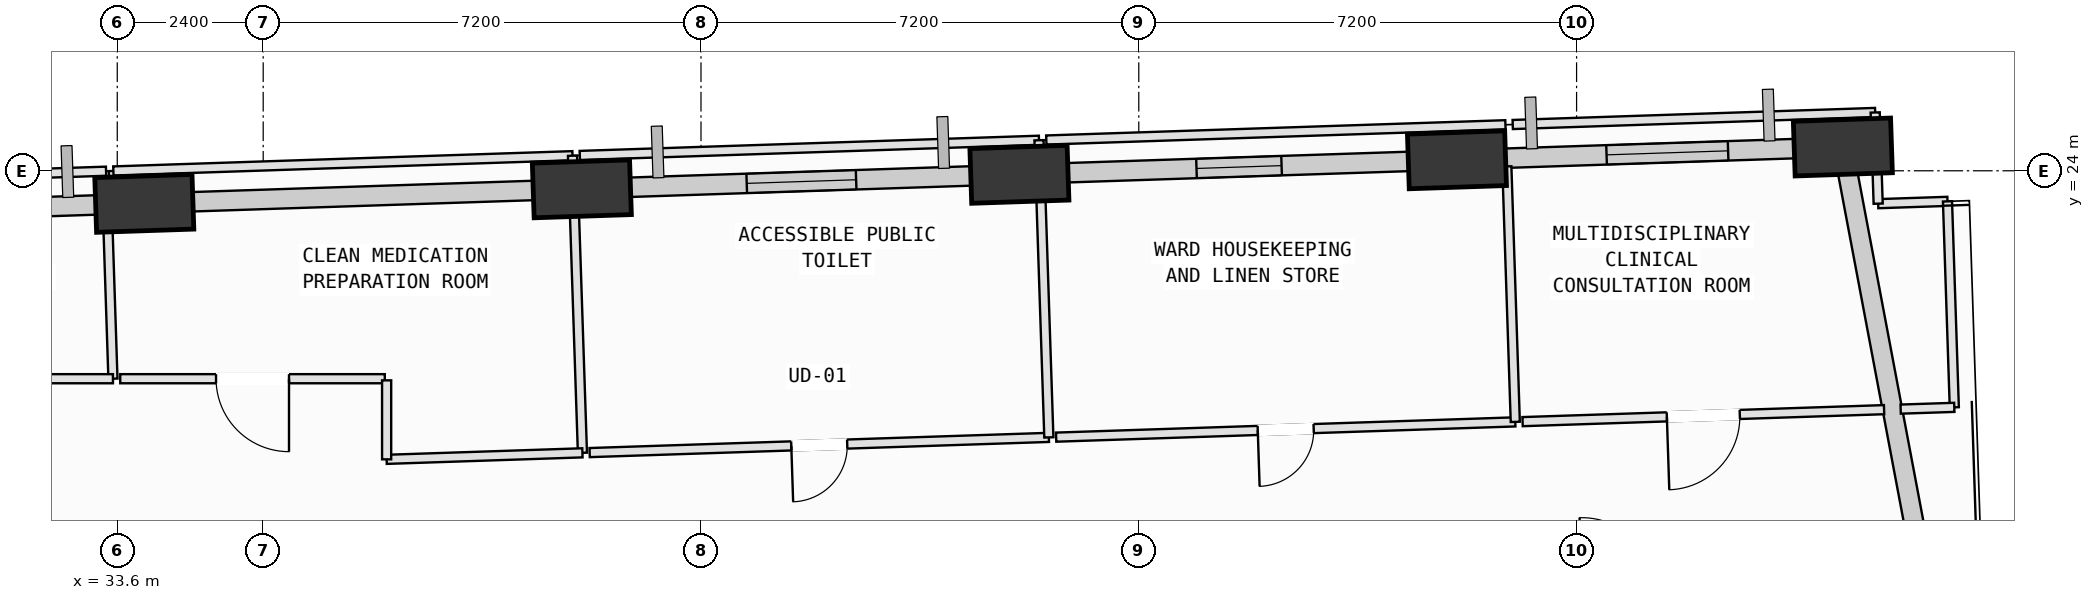
"""IFC4 building model, lengths in metres.
Left out: names, types, materials, properties, quantities, classifications, styles, units other than length and angle.
Written with IfcOpenShell. Run it as: python <this file> out.ifc"""

import sys

from ifc_helpers import new_model, si_unit, direction, frame, frame_2d, origin, origin_2d, place, context, subcontext, project, spatial, rectangle, extrude, element, fill, save


model = new_model("IFC4")
c1 = context("Model", 3, precision=1e-05, world=origin(), true_north=direction((0.0, 1.0)))
c2 = subcontext(c1, "Body", "Model", "MODEL_VIEW")
j1 = project(units=[si_unit("LENGTHUNIT", "METRE"), si_unit("PLANEANGLEUNIT", "RADIAN")], contexts=[c1])
p1 = place(None, origin())
s1 = spatial("IfcSite", under=j1, at=p1, CompositionType="ELEMENT")
p2 = place(p1, origin())
s2 = spatial("IfcBuilding", under=s1, at=p2, CompositionType="ELEMENT")
p3 = place(p2, frame((0.0, 0.0, 31.0)))
s3 = spatial("IfcBuildingStorey", under=s2, at=p3, CompositionType="ELEMENT", Elevation=31.0)
p4 = place(p3, frame((61.979, 24.391, 0.002), z_axis=(0.000728026521, 0.116848256675, 0.993149512858), x_axis=(-0.999635972632, -0.026700426873, 0.003874199989)))
e1 = element("IfcColumn", 1, at=p4, inside=s3, PredefinedType="COLUMN", context=c2, shape_type="SweptSolid", body=[
    extrude(rectangle(XDim=1.6, YDim=0.9, at=origin_2d()), origin(), (0.0, 0.0, 1.0), 4.024),
])
p5 = place(p3, frame((55.633, 24.18, 0.002), z_axis=(0.001825022721, 0.090946965617, 0.99585406498), x_axis=(-0.999911476925, -0.012959253043, 0.003015969921)))
e2 = element("IfcColumn", 2, at=p5, inside=s3, PredefinedType="COLUMN", context=c2, shape_type="SweptSolid", body=[
    extrude(rectangle(XDim=1.6, YDim=0.9, at=origin_2d()), origin(), (0.0, 0.0, 1.0), 4.013),
])
p6 = place(p3, frame((48.437, 23.942, 0.002), z_axis=(0.003048590926, 0.061398621247, 0.998108669135), x_axis=(-0.999861584923, 0.016512321964, 0.002038190045)))
e3 = element("IfcColumn", 3, at=p6, inside=s3, PredefinedType="COLUMN", context=c2, shape_type="SweptSolid", body=[
    extrude(rectangle(XDim=1.6, YDim=0.9, at=origin_2d()), origin(), (0.0, 0.0, 1.0), 4.004),
])
p7 = place(p3, frame((41.24, 23.703, 0.002), z_axis=(0.004334983307, 0.031688117412, 0.999488404702), x_axis=(-0.99471880783, 0.102632201953, 0.001060410662)))
e4 = element("IfcColumn", 4, at=p7, inside=s3, PredefinedType="COLUMN", context=c2, shape_type="SweptSolid", body=[
    extrude(rectangle(XDim=1.6, YDim=0.9, at=origin_2d()), origin(), (0.0, 0.0, 1.0), 3.999),
])
p8 = place(p3, frame((34.044, 23.464, 0.002), z_axis=(0.005558854074, 0.001832589255, 0.999982870232), x_axis=(-0.344410613916, 0.938819094055, 0.000194061884)))
e5 = element("IfcColumn", 5, at=p8, inside=s3, PredefinedType="COLUMN", context=c2, shape_type="SweptSolid", body=[
    extrude(rectangle(XDim=1.6, YDim=0.9, at=origin_2d()), origin(), (0.0, 0.0, 1.0), 3.997),
])
p9 = place(p3, frame((62.049, 24.022, 0.0), z_axis=(0.0, 0.0, 1.0), x_axis=(0.185503389707, -0.982643624315, 0.0)))
e6 = element("IfcWall", 6, at=p9, inside=s3, PredefinedType="SOLIDWALL", context=c2, shape_type="SweptSolid", body=[
    extrude(rectangle(XDim=8.614, YDim=0.32, at=frame_2d((4.307, 0.0))), origin(), (0.0, 0.0, 1.0), 3.165),
])
p10 = place(p3, frame((56.222, 24.2, 0.0), z_axis=(0.0, 0.0, 1.0), x_axis=(0.999450872854, 0.033135370087, 0.0)))
e7 = element("IfcWall", 7, at=p10, inside=s3, PredefinedType="SOLIDWALL", context=c2, shape_type="SweptSolid", body=[
    extrude(rectangle(XDim=5.209, YDim=0.32, at=frame_2d((2.604, 0.0))), origin(), (0.0, 0.0, 1.0), 3.165),
])
p11 = place(p10, frame((1.872, 0.0, 0.75)))
e8 = element("IfcOpeningElement", 8, at=p11, cuts=e7, PredefinedType="OPENING", context=c2, shape_type="SweptSolid", body=[
    extrude(rectangle(XDim=2.0, YDim=1.95, at=frame_2d((1.0, 0.975))), frame((0.0, 0.17, 0.0), z_axis=(0.0, -1.0, 0.0), x_axis=(1.0, 0.0, 0.0)), (0.0, 0.0, 1.0), 0.34),
])
p12 = place(p3, frame((49.042, 23.961, 0.0), z_axis=(0.0, 0.0, 1.0), x_axis=(0.999449037316, 0.033190688572, 0.0)))
e9 = element("IfcWall", 9, at=p12, inside=s3, PredefinedType="SOLIDWALL", context=c2, shape_type="SweptSolid", body=[
    extrude(rectangle(XDim=6.024, YDim=0.32, at=frame_2d((3.012, 0.0))), origin(), (0.0, 0.0, 1.0), 3.165),
])
p13 = place(p12, frame((2.309, 0.0, 0.75)))
e10 = element("IfcOpeningElement", 10, at=p13, cuts=e9, PredefinedType="OPENING", context=c2, shape_type="SweptSolid", body=[
    extrude(rectangle(XDim=1.4, YDim=1.85, at=frame_2d((0.7, 0.925))), frame((0.0, 0.17, 0.0), z_axis=(0.0, -1.0, 0.0), x_axis=(1.0, 0.0, 0.0)), (0.0, 0.0, 1.0), 0.34),
])
p14 = place(p3, frame((41.855, 23.723, 0.0), z_axis=(0.0, 0.0, 1.0), x_axis=(0.999449908842, 0.033164434498, 0.0)))
e11 = element("IfcWall", 11, at=p14, inside=s3, PredefinedType="SOLIDWALL", context=c2, shape_type="SweptSolid", body=[
    extrude(rectangle(XDim=6.0, YDim=0.32, at=frame_2d((3.0, 0.0))), origin(), (0.0, 0.0, 1.0), 3.165),
])
p15 = place(p14, frame((2.098, 0.0, 0.75)))
e12 = element("IfcOpeningElement", 12, at=p15, cuts=e11, PredefinedType="OPENING", context=c2, shape_type="SweptSolid", body=[
    extrude(rectangle(XDim=1.8, YDim=2.05, at=frame_2d((0.9, 1.025))), frame((0.0, 0.17, 0.0), z_axis=(0.0, -1.0, 0.0), x_axis=(1.0, 0.0, 0.0)), (0.0, 0.0, 1.0), 0.34),
])
p16 = place(p3, frame((34.663, 23.485, 0.0), z_axis=(0.0, 0.0, 1.0), x_axis=(0.999450324631, 0.033151901833, 0.0)))
e13 = element("IfcWall", 13, at=p16, inside=s3, PredefinedType="SOLIDWALL", context=c2, shape_type="SweptSolid", body=[
    extrude(rectangle(XDim=5.987, YDim=0.32, at=frame_2d((2.994, 0.0))), origin(), (0.0, 0.0, 1.0), 3.165),
])
p17 = place(p3, frame((27.715, 23.254, 0.0), z_axis=(0.0, 0.0, 1.0), x_axis=(0.999450231938, 0.033154696192, 0.0)))
e14 = element("IfcWall", 14, at=p17, inside=s3, PredefinedType="SOLIDWALL", context=c2, shape_type="SweptSolid", body=[
    extrude(rectangle(XDim=5.736, YDim=0.32, at=frame_2d((2.868, 0.0))), origin(), (0.0, 0.0, 1.0), 3.165),
])
p18 = place(p17, frame((1.957, 0.0, 0.75)))
e15 = element("IfcOpeningElement", 15, at=p18, cuts=e14, PredefinedType="OPENING", context=c2, shape_type="SweptSolid", body=[
    extrude(rectangle(XDim=1.6, YDim=1.95, at=frame_2d((0.8, 0.975))), frame((0.0, 0.17, 0.0), z_axis=(0.0, -1.0, 0.0), x_axis=(1.0, 0.0, 0.0)), (0.0, 0.0, 1.0), 0.34),
])
p19 = place(p3, frame((27.63, 23.802, 0.0), z_axis=(0.0, 0.0, 1.0), x_axis=(0.999456083322, 0.032977833635, 0.0)))
e16 = element("IfcWall", 16, at=p19, inside=s3, PredefinedType="PARTITIONING", context=c2, shape_type="SweptSolid", body=[
    extrude(rectangle(XDim=5.789, YDim=0.15, at=frame_2d((2.895, 0.0))), origin(), (0.0, 0.0, 1.0), 3.78),
])
p20 = place(p3, frame((33.439, 23.309, 0.0), z_axis=(0.0, 0.0, 1.0), x_axis=(0.03299329991, -0.99945557288, 0.0)))
e17 = element("IfcWall", 17, at=p20, inside=s3, PredefinedType="PARTITIONING", context=c2, shape_type="SweptSolid", body=[
    extrude(rectangle(XDim=2.73, YDim=0.15, at=frame_2d((1.365, 0.0))), origin(), (0.0, 0.0, 1.0), 3.78),
])
p21 = place(p3, frame((33.529, 20.58, 0.0), z_axis=(0.0, 0.0, 1.0), x_axis=(-1.0, 0.0, 0.0)))
e18 = element("IfcWall", 18, at=p21, inside=s3, PredefinedType="PARTITIONING", context=c2, shape_type="SweptSolid", body=[
    extrude(rectangle(XDim=7.559, YDim=0.15, at=frame_2d((3.78, 0.0))), origin(), (0.0, 0.0, 1.0), 3.78),
])
p22 = place(p21, frame((3.179, 0.0, 0.0)))
e19 = element("IfcOpeningElement", 19, at=p22, cuts=e18, PredefinedType="OPENING", context=c2, shape_type="SweptSolid", body=[
    extrude(rectangle(XDim=1.2, YDim=2.15, at=frame_2d((0.6, 1.075))), frame((0.0, 0.085, 0.0), z_axis=(0.0, -1.0, 0.0), x_axis=(1.0, 0.0, 0.0)), (0.0, 0.0, 1.0), 0.17),
])
p23 = place(p3, frame((38.0, 20.58, 0.0), z_axis=(0.0, 0.0, 1.0), x_axis=(-1.0, 0.0, 0.0)))
e20 = element("IfcWall", 20, at=p23, inside=s3, PredefinedType="PARTITIONING", context=c2, shape_type="SweptSolid", body=[
    extrude(rectangle(XDim=4.351, YDim=0.15, at=frame_2d((2.176, 0.0))), origin(), (0.0, 0.0, 1.0), 3.365),
])
p24 = place(p23, frame((1.575, 0.0, 0.0)))
e21 = element("IfcOpeningElement", 21, at=p24, cuts=e20, PredefinedType="OPENING", context=c2, shape_type="SweptSolid", body=[
    extrude(rectangle(XDim=1.2, YDim=2.15, at=frame_2d((0.6, 1.075))), frame((0.0, 0.085, 0.0), z_axis=(0.0, -1.0, 0.0), x_axis=(1.0, 0.0, 0.0)), (0.0, 0.0, 1.0), 0.17),
])
p25 = place(p3, frame((33.551, 23.531, 0.0), z_axis=(0.0, 0.0, 1.0), x_axis=(-0.03246062176, 0.999473015161, 0.0)))
e22 = element("IfcWall", 22, at=p25, inside=s3, PredefinedType="PARTITIONING", context=c2, shape_type="SweptSolid", body=[
    extrude(rectangle(XDim=0.466, YDim=0.15, at=frame_2d((0.233, 0.0))), origin(), (0.0, 0.0, 1.0), 3.78),
])
p26 = place(p3, frame((33.536, 23.997, 0.0), z_axis=(0.0, 0.0, 1.0), x_axis=(0.999448094367, 0.033219070808, 0.0)))
e23 = element("IfcWall", 23, at=p26, inside=s3, PredefinedType="PARTITIONING", context=c2, shape_type="SweptSolid", body=[
    extrude(rectangle(XDim=7.555, YDim=0.15, at=frame_2d((3.778, 0.0))), origin(), (0.0, 0.0, 1.0), 3.78),
])
p27 = place(p3, frame((41.087, 24.248, 0.0), z_axis=(0.0, 0.0, 1.0), x_axis=(0.033353067191, -0.999443631682, 0.0)))
e24 = element("IfcWall", 24, at=p27, inside=s3, PredefinedType="PARTITIONING", context=c2, shape_type="SweptSolid", body=[
    extrude(rectangle(XDim=4.89, YDim=0.15, at=frame_2d((2.445, 0.0))), origin(), (0.0, 0.0, 1.0), 3.78),
])
p28 = place(p3, frame((41.25, 19.361, 0.0), z_axis=(0.0, 0.0, 1.0), x_axis=(-0.999446503828, -0.033266890225, 0.0)))
e25 = element("IfcWall", 25, at=p28, inside=s3, PredefinedType="PARTITIONING", context=c2, shape_type="SweptSolid", body=[
    extrude(rectangle(XDim=3.222, YDim=0.15, at=frame_2d((1.611, 0.0))), origin(), (0.0, 0.0, 1.0), 3.78),
])
p29 = place(p3, frame((38.03, 19.254, 0.0), z_axis=(0.0, 0.0, 1.0), x_axis=(0.0, 1.0, 0.0)))
e26 = element("IfcWall", 26, at=p29, inside=s3, PredefinedType="PARTITIONING", context=c2, shape_type="SweptSolid", body=[
    extrude(rectangle(XDim=1.299, YDim=0.15, at=frame_2d((0.649, 0.0))), origin(), (0.0, 0.0, 1.0), 3.78),
])
p30 = place(p3, frame((48.921, 19.615, 0.0), z_axis=(0.0, 0.0, 1.0), x_axis=(-0.999452518979, -0.033085681293, 0.0)))
e27 = element("IfcWall", 27, at=p30, inside=s3, PredefinedType="PARTITIONING", context=c2, shape_type="SweptSolid", body=[
    extrude(rectangle(XDim=7.556, YDim=0.15, at=frame_2d((3.778, 0.0))), origin(), (0.0, 0.0, 1.0), 3.78),
])
p31 = place(p30, frame((3.318, 0.0, 0.0)))
e28 = element("IfcOpeningElement", 28, at=p31, cuts=e27, PredefinedType="OPENING", context=c2, shape_type="SweptSolid", body=[
    extrude(rectangle(XDim=0.92, YDim=2.1, at=frame_2d((0.46, 1.05))), frame((0.0, 0.085, 0.0), z_axis=(0.0, -1.0, 0.0), x_axis=(1.0, 0.0, 0.0)), (0.0, 0.0, 1.0), 0.17),
])
p32 = place(p3, frame((41.207, 24.252, 0.0), z_axis=(0.0, 0.0, 1.0), x_axis=(0.999452518979, 0.033085681293, 0.0)))
e29 = element("IfcWall", 29, at=p32, inside=s3, PredefinedType="PARTITIONING", context=c2, shape_type="SweptSolid", body=[
    extrude(rectangle(XDim=7.556, YDim=0.15, at=frame_2d((3.778, 0.0))), origin(), (0.0, 0.0, 1.0), 3.165),
])
p33 = place(p3, frame((48.759, 24.502, 0.0), z_axis=(0.0, 0.0, 1.0), x_axis=(0.033103693094, -0.999451922557, 0.0)))
e30 = element("IfcWall", 30, at=p33, inside=s3, PredefinedType="PARTITIONING", context=c2, shape_type="SweptSolid", body=[
    extrude(rectangle(XDim=4.89, YDim=0.15, at=frame_2d((2.445, 0.0))), origin(), (0.0, 0.0, 1.0), 3.78),
])
p34 = place(p3, frame((56.592, 19.87, 0.0), z_axis=(0.0, 0.0, 1.0), x_axis=(-0.99944702099, -0.033251349368, 0.0)))
e31 = element("IfcWall", 31, at=p34, inside=s3, PredefinedType="PARTITIONING", context=c2, shape_type="SweptSolid", body=[
    extrude(rectangle(XDim=7.555, YDim=0.15, at=frame_2d((3.778, 0.0))), origin(), (0.0, 0.0, 1.0), 3.78),
])
p35 = place(p34, frame((3.318, 0.0, 0.0)))
e32 = element("IfcOpeningElement", 32, at=p35, cuts=e31, PredefinedType="OPENING", context=c2, shape_type="SweptSolid", body=[
    extrude(rectangle(XDim=0.92, YDim=2.1, at=frame_2d((0.46, 1.05))), frame((0.0, 0.085, 0.0), z_axis=(0.0, -1.0, 0.0), x_axis=(1.0, 0.0, 0.0)), (0.0, 0.0, 1.0), 0.17),
])
p36 = place(p3, frame((48.879, 24.506, 0.0), z_axis=(0.0, 0.0, 1.0), x_axis=(0.999448094367, 0.033219070808, 0.0)))
e33 = element("IfcWall", 33, at=p36, inside=s3, PredefinedType="PARTITIONING", context=c2, shape_type="SweptSolid", body=[
    extrude(rectangle(XDim=7.555, YDim=0.15, at=frame_2d((3.778, 0.0))), origin(), (0.0, 0.0, 1.0), 3.165),
])
p37 = place(p3, frame((56.453, 24.072, 0.0), z_axis=(0.0, 0.0, 1.0), x_axis=(0.033100206942, -0.999452038019, 0.0)))
e34 = element("IfcWall", 34, at=p37, inside=s3, PredefinedType="PARTITIONING", context=c2, shape_type="SweptSolid", body=[
    extrude(rectangle(XDim=4.204, YDim=0.15, at=frame_2d((2.102, 0.0))), origin(), (0.0, 0.0, 1.0), 3.78),
])
p38 = place(p3, frame((62.56, 23.459, 0.0), z_axis=(0.0, 0.0, 1.0), x_axis=(0.999442290529, 0.033393231382, 0.0)))
e35 = element("IfcWall", 35, at=p38, inside=s3, PredefinedType="PARTITIONING", context=c2, shape_type="SweptSolid", body=[
    extrude(rectangle(XDim=1.141, YDim=0.15, at=frame_2d((0.57, 0.0))), origin(), (0.0, 0.0, 1.0), 3.78),
])
p39 = place(p3, frame((63.7, 23.497, 0.0), z_axis=(0.0, 0.0, 1.0), x_axis=(0.033055855253, -0.999453505889, 0.0)))
e36 = element("IfcWall", 36, at=p39, inside=s3, PredefinedType="PARTITIONING", context=c2, shape_type="SweptSolid", body=[
    extrude(rectangle(XDim=3.39, YDim=0.15, at=frame_2d((1.695, 0.0))), origin(), (0.0, 0.0, 1.0), 3.78),
])
p40 = place(p3, frame((63.812, 20.109, 0.0), z_axis=(0.0, 0.0, 1.0), x_axis=(-0.999467093729, -0.032642434835, 0.0)))
e37 = element("IfcWall", 37, at=p40, inside=s3, PredefinedType="PARTITIONING", context=c2, shape_type="SweptSolid", body=[
    extrude(rectangle(XDim=0.883, YDim=0.15, at=frame_2d((0.441, 0.0))), origin(), (0.0, 0.0, 1.0), 3.78),
])
p41 = place(p3, frame((62.657, 20.071, 0.0), z_axis=(0.0, 0.0, 1.0), x_axis=(-0.999451311422, -0.033122139063, 0.0)))
e38 = element("IfcWall", 38, at=p41, inside=s3, PredefinedType="PARTITIONING", context=c2, shape_type="SweptSolid", body=[
    extrude(rectangle(XDim=5.948, YDim=0.15, at=frame_2d((2.974, 0.0))), origin(), (0.0, 0.0, 1.0), 3.78),
])
p42 = place(p41, frame((2.374, 0.0, 0.0)))
e39 = element("IfcOpeningElement", 39, at=p42, cuts=e38, PredefinedType="OPENING", context=c2, shape_type="SweptSolid", body=[
    extrude(rectangle(XDim=1.2, YDim=2.15, at=frame_2d((0.6, 1.075))), frame((0.0, 0.085, 0.0), z_axis=(0.0, -1.0, 0.0), x_axis=(1.0, 0.0, 0.0)), (0.0, 0.0, 1.0), 0.17),
])
p43 = place(p3, frame((56.55, 24.761, 0.0), z_axis=(0.0, 0.0, 1.0), x_axis=(0.999448807252, 0.033197615608, 0.0)))
e40 = element("IfcWall", 40, at=p43, inside=s3, PredefinedType="PARTITIONING", context=c2, shape_type="SweptSolid", body=[
    extrude(rectangle(XDim=5.964, YDim=0.15, at=frame_2d((2.982, 0.0))), origin(), (0.0, 0.0, 1.0), 3.165),
])
p44 = place(p3, frame((62.511, 24.959, 0.0), z_axis=(0.0, 0.0, 1.0), x_axis=(0.032697351079, -0.999465298663, 0.0)))
e41 = element("IfcWall", 41, at=p44, inside=s3, PredefinedType="PARTITIONING", context=c2, shape_type="SweptSolid", body=[
    extrude(rectangle(XDim=1.501, YDim=0.15, at=frame_2d((0.75, 0.0))), origin(), (0.0, 0.0, 1.0), 3.165),
])
p45 = place(p11, origin())
e42 = element("IfcWindow", 42, at=p45, inside=s3, PartitioningType="SINGLE_PANEL", PredefinedType="WINDOW", context=c2, shape_type="SweptSolid", body=[
    extrude(rectangle(XDim=2.0, YDim=1.95, at=frame_2d((1.0, 0.975))), frame((0.0, 0.03, 0.0), z_axis=(0.0, -1.0, 0.0), x_axis=(1.0, 0.0, 0.0)), (0.0, 0.0, 1.0), 0.06),
])
fill(e8, e42)
p46 = place(p13, origin())
e43 = element("IfcWindow", 43, at=p46, inside=s3, PartitioningType="SINGLE_PANEL", PredefinedType="WINDOW", context=c2, shape_type="SweptSolid", body=[
    extrude(rectangle(XDim=1.4, YDim=1.85, at=frame_2d((0.7, 0.925))), frame((0.0, 0.03, 0.0), z_axis=(0.0, -1.0, 0.0), x_axis=(1.0, 0.0, 0.0)), (0.0, 0.0, 1.0), 0.06),
])
fill(e10, e43)
p47 = place(p15, origin())
e44 = element("IfcWindow", 44, at=p47, inside=s3, PartitioningType="SINGLE_PANEL", PredefinedType="WINDOW", context=c2, shape_type="SweptSolid", body=[
    extrude(rectangle(XDim=1.8, YDim=2.05, at=frame_2d((0.9, 1.025))), frame((0.0, 0.03, 0.0), z_axis=(0.0, -1.0, 0.0), x_axis=(1.0, 0.0, 0.0)), (0.0, 0.0, 1.0), 0.06),
])
fill(e12, e44)
p48 = place(p24, origin())
e45 = element("IfcDoor", 45, at=p48, inside=s3, OperationType="SINGLE_SWING_LEFT", PredefinedType="DOOR", context=c2, shape_type="SweptSolid", body=[
    extrude(rectangle(XDim=1.2, YDim=2.15, at=frame_2d((0.6, 1.075))), frame((0.0, 0.025, 0.0), z_axis=(0.0, -1.0, 0.0), x_axis=(1.0, 0.0, 0.0)), (0.0, 0.0, 1.0), 0.05),
])
fill(e21, e45)
p49 = place(p31, origin())
e46 = element("IfcDoor", 46, at=p49, inside=s3, OperationType="SINGLE_SWING_RIGHT", PredefinedType="DOOR", context=c2, shape_type="SweptSolid", body=[
    extrude(rectangle(XDim=0.92, YDim=2.1, at=frame_2d((0.46, 1.05))), frame((0.0, 0.025, 0.0), z_axis=(0.0, -1.0, 0.0), x_axis=(1.0, 0.0, 0.0)), (0.0, 0.0, 1.0), 0.05),
])
fill(e28, e46)
p50 = place(p35, origin())
e47 = element("IfcDoor", 47, at=p50, inside=s3, OperationType="SINGLE_SWING_RIGHT", PredefinedType="DOOR", context=c2, shape_type="SweptSolid", body=[
    extrude(rectangle(XDim=0.92, YDim=2.1, at=frame_2d((0.46, 1.05))), frame((0.0, 0.025, 0.0), z_axis=(0.0, -1.0, 0.0), x_axis=(1.0, 0.0, 0.0)), (0.0, 0.0, 1.0), 0.05),
])
fill(e32, e47)
p51 = place(p42, origin())
e48 = element("IfcDoor", 48, at=p51, inside=s3, OperationType="SINGLE_SWING_RIGHT", PredefinedType="DOOR", context=c2, shape_type="SweptSolid", body=[
    extrude(rectangle(XDim=1.2, YDim=2.15, at=frame_2d((0.6, 1.075))), frame((0.0, 0.025, 0.0), z_axis=(0.0, -1.0, 0.0), x_axis=(1.0, 0.0, 0.0)), (0.0, 0.0, 1.0), 0.05),
])
fill(e39, e48)
save(model, sys.argv[1])
